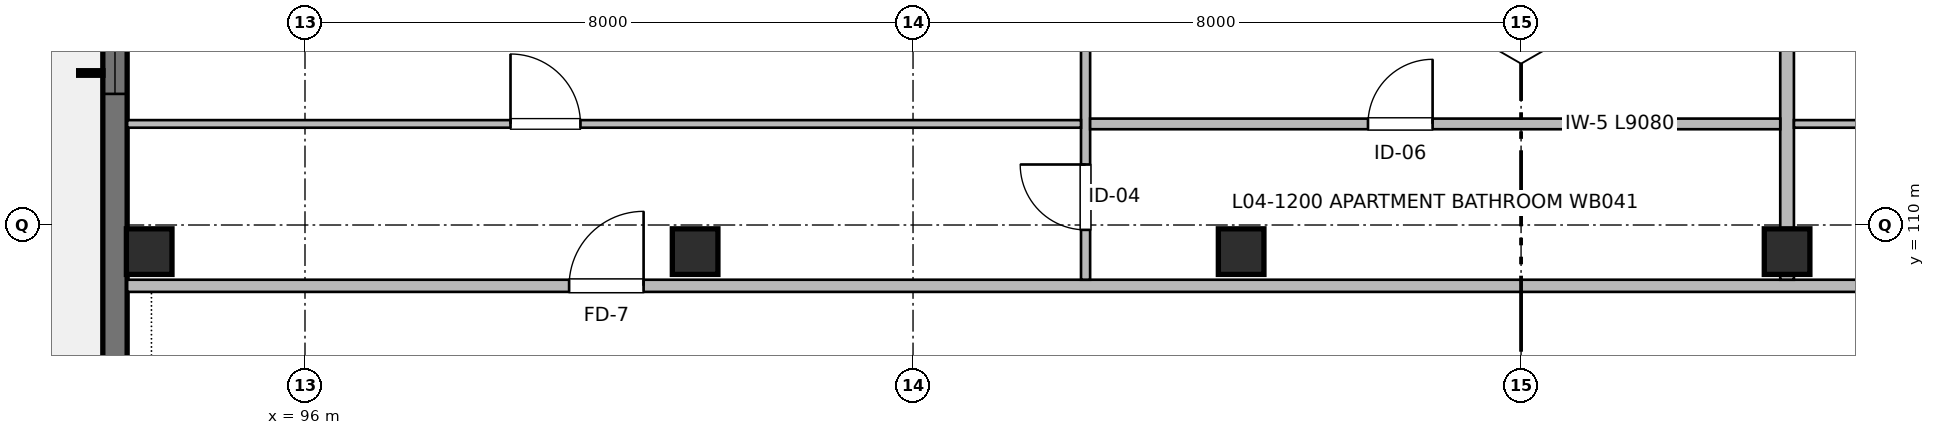
"""IFC4 building model, lengths in metres.
Left out: names, types, materials, properties, quantities, classifications, styles, units other than length and angle.
Written with IfcOpenShell. Run it as: python <this file> out.ifc"""

import sys

from ifc_helpers import new_model, si_unit, direction, frame, frame_2d, origin, origin_2d, place, context, subcontext, project, spatial, rectangle, extrude, element, fill, save


model = new_model("IFC4")
c1 = context("Model", 3, precision=1e-05, world=origin(), true_north=direction((0.0, 1.0)))
c2 = subcontext(c1, "Body", "Model", "MODEL_VIEW")
j1 = project(units=[si_unit("LENGTHUNIT", "METRE"), si_unit("PLANEANGLEUNIT", "RADIAN")], contexts=[c1])
p1 = place(None, origin())
s1 = spatial("IfcSite", under=j1, at=p1, CompositionType="ELEMENT")
p2 = place(p1, origin())
s2 = spatial("IfcBuilding", under=s1, at=p2, CompositionType="ELEMENT")
p3 = place(p2, frame((0.0, 0.0, 13.76)))
s3 = spatial("IfcBuildingStorey", under=s2, at=p3, CompositionType="ELEMENT", Elevation=13.76)
for number, where, z_axis, x_axis in (
    (1, (93.95, 109.65, 0.0), (0.0, 0.0, 1.0), (1.0, 0.0, 0.0)),
    (2, (101.133, 109.65, 0.0), (0.0, 0.0, 1.0), (1.0, 0.0, 0.0)),
    (3, (108.317, 109.65, 0.0), (0.0, 0.0, 1.0), (1.0, 0.0, 0.0)),
    (4, (115.5, 109.65, 0.0), (0.0, 0.0, 1.0), (1.0, 0.0, 0.0)),
):
    element("IfcColumn", number, at=place(p3, frame(where, z_axis=z_axis, x_axis=x_axis)), inside=s3, PredefinedType="COLUMN", context=c2, shape_type="SweptSolid", body=[
        extrude(rectangle(XDim=0.6, YDim=0.6, at=origin_2d()), origin(), (0.0, 0.0, 1.0), 3.2),
    ])
p4 = place(p3, frame((93.5, 100.0, 0.0), z_axis=(0.0, 0.0, 1.0), x_axis=(0.0, 1.0, 0.0)))
e5 = element("IfcWall", 5, at=p4, inside=s3, PredefinedType="SHEAR", context=c2, shape_type="SweptSolid", body=[
    extrude(rectangle(XDim=16.0, YDim=0.32, at=frame_2d((8.0, 0.0))), origin(), (0.0, 0.0, 1.0), 2.98),
])
p5 = place(p4, frame((3.4, 0.0, 0.0)))
e6 = element("IfcOpeningElement", 6, at=p5, cuts=e5, PredefinedType="OPENING", context=c2, shape_type="SweptSolid", body=[
    extrude(rectangle(XDim=1.2, YDim=2.2, at=frame_2d((0.6, 1.1))), frame((0.0, 0.17, 0.0), z_axis=(0.0, -1.0, 0.0), x_axis=(1.0, 0.0, 0.0)), (0.0, 0.0, 1.0), 0.34),
])
p6 = place(p4, frame((4.85, 0.0, 0.77)))
e7 = element("IfcOpeningElement", 7, at=p6, cuts=e5, PredefinedType="OPENING", context=c2, shape_type="SweptSolid", body=[
    extrude(rectangle(XDim=1.6, YDim=1.45, at=frame_2d((0.8, 0.725))), frame((0.0, 0.17, 0.0), z_axis=(0.0, -1.0, 0.0), x_axis=(1.0, 0.0, 0.0)), (0.0, 0.0, 1.0), 0.34),
])
p7 = place(p4, frame((11.725, 0.0, 0.77)))
e8 = element("IfcOpeningElement", 8, at=p7, cuts=e5, PredefinedType="OPENING", context=c2, shape_type="SweptSolid", body=[
    extrude(rectangle(XDim=1.45, YDim=1.45, at=frame_2d((0.725, 0.725))), frame((0.0, 0.17, 0.0), z_axis=(0.0, -1.0, 0.0), x_axis=(1.0, 0.0, 0.0)), (0.0, 0.0, 1.0), 0.34),
])
p8 = place(p3, frame((93.66, 109.2, 0.0), z_axis=(0.0, 0.0, 1.0), x_axis=(1.0, 0.0, 0.0)))
e9 = element("IfcWall", 9, at=p8, inside=s3, PredefinedType="PARTITIONING", context=c2, shape_type="SweptSolid", body=[
    extrude(rectangle(XDim=43.68, YDim=0.16, at=frame_2d((21.84, 0.0))), origin(), (0.0, 0.0, 1.0), 2.935),
])
p9 = place(p8, frame((5.815, 0.0, 0.0)))
e10 = element("IfcOpeningElement", 10, at=p9, cuts=e9, PredefinedType="OPENING", context=c2, shape_type="SweptSolid", body=[
    extrude(rectangle(XDim=0.98, YDim=2.15, at=frame_2d((0.49, 1.075))), frame((0.0, 0.09, 0.0), z_axis=(0.0, -1.0, 0.0), x_axis=(1.0, 0.0, 0.0)), (0.0, 0.0, 1.0), 0.18),
])
p10 = place(p8, frame((27.35, 0.0, 0.0)))
e11 = element("IfcOpeningElement", 11, at=p10, cuts=e9, PredefinedType="OPENING", context=c2, shape_type="SweptSolid", body=[
    extrude(rectangle(XDim=0.98, YDim=2.15, at=frame_2d((0.49, 1.075))), frame((0.0, 0.09, 0.0), z_axis=(0.0, -1.0, 0.0), x_axis=(1.0, 0.0, 0.0)), (0.0, 0.0, 1.0), 0.18),
])
p11 = place(p3, frame((115.5, 109.28, 0.0), z_axis=(0.0, 0.0, 1.0), x_axis=(0.0, 1.0, 0.0)))
e12 = element("IfcWall", 12, at=p11, inside=s3, PredefinedType="PARTITIONING", context=c2, shape_type="SweptSolid", body=[
    extrude(rectangle(XDim=6.59, YDim=0.18, at=frame_2d((3.295, 0.0))), origin(), (0.0, 0.0, 1.0), 2.68),
])
p12 = place(p3, frame((106.27, 109.28, 0.0), z_axis=(0.0, 0.0, 1.0), x_axis=(0.0, 1.0, 0.0)))
e13 = element("IfcWall", 13, at=p12, inside=s3, PredefinedType="PARTITIONING", context=c2, shape_type="SweptSolid", body=[
    extrude(rectangle(XDim=6.59, YDim=0.12, at=frame_2d((3.295, 0.0))), origin(), (0.0, 0.0, 1.0), 2.935),
])
p13 = place(p12, frame((0.656, 0.0, 0.0)))
e14 = element("IfcOpeningElement", 14, at=p13, cuts=e13, PredefinedType="OPENING", context=c2, shape_type="SweptSolid", body=[
    extrude(rectangle(XDim=0.86, YDim=2.1, at=frame_2d((0.43, 1.05))), frame((0.0, 0.07, 0.0), z_axis=(0.0, -1.0, 0.0), x_axis=(1.0, 0.0, 0.0)), (0.0, 0.0, 1.0), 0.14),
])
p14 = place(p12, frame((4.093, 0.0, 0.0)))
e15 = element("IfcOpeningElement", 15, at=p14, cuts=e13, PredefinedType="OPENING", context=c2, shape_type="SweptSolid", body=[
    extrude(rectangle(XDim=0.9, YDim=2.1, at=frame_2d((0.45, 1.05))), frame((0.0, 0.07, 0.0), z_axis=(0.0, -1.0, 0.0), x_axis=(1.0, 0.0, 0.0)), (0.0, 0.0, 1.0), 0.14),
])
p15 = place(p3, frame((106.33, 111.33, 0.0), z_axis=(0.0, 0.0, 1.0), x_axis=(1.0, 0.0, 0.0)))
e16 = element("IfcWall", 16, at=p15, inside=s3, PredefinedType="PARTITIONING", context=c2, shape_type="SweptSolid", body=[
    extrude(rectangle(XDim=9.08, YDim=0.14, at=frame_2d((4.54, 0.0))), origin(), (0.0, 0.0, 1.0), 2.935),
])
p16 = place(p15, frame((3.656, 0.0, 0.0)))
e17 = element("IfcOpeningElement", 17, at=p16, cuts=e16, PredefinedType="OPENING", context=c2, shape_type="SweptSolid", body=[
    extrude(rectangle(XDim=0.85, YDim=2.05, at=frame_2d((0.425, 1.025))), frame((0.0, 0.08, 0.0), z_axis=(0.0, -1.0, 0.0), x_axis=(1.0, 0.0, 0.0)), (0.0, 0.0, 1.0), 0.16),
])
p17 = place(p3, frame((93.66, 111.33, 0.0), z_axis=(0.0, 0.0, 1.0), x_axis=(1.0, 0.0, 0.0)))
e18 = element("IfcWall", 18, at=p17, inside=s3, PredefinedType="PARTITIONING", context=c2, shape_type="SweptSolid", body=[
    extrude(rectangle(XDim=12.55, YDim=0.1, at=frame_2d((6.275, 0.0))), origin(), (0.0, 0.0, 1.0), 2.935),
])
p18 = place(p17, frame((5.044, 0.0, 0.0)))
e19 = element("IfcOpeningElement", 19, at=p18, cuts=e18, PredefinedType="OPENING", context=c2, shape_type="SweptSolid", body=[
    extrude(rectangle(XDim=0.92, YDim=2.1, at=frame_2d((0.46, 1.05))), frame((0.0, 0.06, 0.0), z_axis=(0.0, -1.0, 0.0), x_axis=(1.0, 0.0, 0.0)), (0.0, 0.0, 1.0), 0.12),
])
p19 = place(p3, frame((115.59, 111.33, 0.0), z_axis=(0.0, 0.0, 1.0), x_axis=(1.0, 0.0, 0.0)))
e20 = element("IfcWall", 20, at=p19, inside=s3, PredefinedType="PARTITIONING", context=c2, shape_type="SweptSolid", body=[
    extrude(rectangle(XDim=12.56, YDim=0.1, at=frame_2d((6.28, 0.0))), origin(), (0.0, 0.0, 1.0), 2.935),
])
p20 = place(p19, frame((5.048, 0.0, 0.0)))
e21 = element("IfcOpeningElement", 21, at=p20, cuts=e20, PredefinedType="OPENING", context=c2, shape_type="SweptSolid", body=[
    extrude(rectangle(XDim=0.92, YDim=2.1, at=frame_2d((0.46, 1.05))), frame((0.0, 0.06, 0.0), z_axis=(0.0, -1.0, 0.0), x_axis=(1.0, 0.0, 0.0)), (0.0, 0.0, 1.0), 0.12),
])
p21 = place(p7, origin())
e22 = element("IfcWindow", 22, at=p21, inside=s3, PartitioningType="SINGLE_PANEL", PredefinedType="WINDOW", context=c2, shape_type="SweptSolid", body=[
    extrude(rectangle(XDim=1.45, YDim=1.45, at=frame_2d((0.725, 0.725))), frame((0.0, 0.03, 0.0), z_axis=(0.0, -1.0, 0.0), x_axis=(1.0, 0.0, 0.0)), (0.0, 0.0, 1.0), 0.06),
])
fill(e8, e22)
p22 = place(p9, origin())
e23 = element("IfcDoor", 23, at=p22, inside=s3, OperationType="SINGLE_SWING_RIGHT", PredefinedType="DOOR", context=c2, shape_type="SweptSolid", body=[
    extrude(rectangle(XDim=0.98, YDim=2.15, at=frame_2d((0.49, 1.075))), frame((0.0, 0.025, 0.0), z_axis=(0.0, -1.0, 0.0), x_axis=(1.0, 0.0, 0.0)), (0.0, 0.0, 1.0), 0.05),
])
fill(e10, e23)
p23 = place(p18, origin())
e24 = element("IfcDoor", 24, at=p23, inside=s3, OperationType="SINGLE_SWING_LEFT", PredefinedType="DOOR", context=c2, shape_type="SweptSolid", body=[
    extrude(rectangle(XDim=0.92, YDim=2.1, at=frame_2d((0.46, 1.05))), frame((0.0, 0.025, 0.0), z_axis=(0.0, -1.0, 0.0), x_axis=(1.0, 0.0, 0.0)), (0.0, 0.0, 1.0), 0.05),
])
fill(e19, e24)
p24 = place(p13, origin())
e25 = element("IfcDoor", 25, at=p24, inside=s3, OperationType="SINGLE_SWING_RIGHT", PredefinedType="DOOR", context=c2, shape_type="SweptSolid", body=[
    extrude(rectangle(XDim=0.86, YDim=2.1, at=frame_2d((0.43, 1.05))), frame((0.0, 0.025, 0.0), z_axis=(0.0, -1.0, 0.0), x_axis=(1.0, 0.0, 0.0)), (0.0, 0.0, 1.0), 0.05),
])
fill(e14, e25)
p25 = place(p16, origin())
e26 = element("IfcDoor", 26, at=p25, inside=s3, OperationType="SINGLE_SWING_RIGHT", PredefinedType="DOOR", context=c2, shape_type="SweptSolid", body=[
    extrude(rectangle(XDim=0.85, YDim=2.05, at=frame_2d((0.425, 1.025))), frame((0.0, 0.025, 0.0), z_axis=(0.0, -1.0, 0.0), x_axis=(1.0, 0.0, 0.0)), (0.0, 0.0, 1.0), 0.05),
])
fill(e17, e26)
save(model, sys.argv[1])
